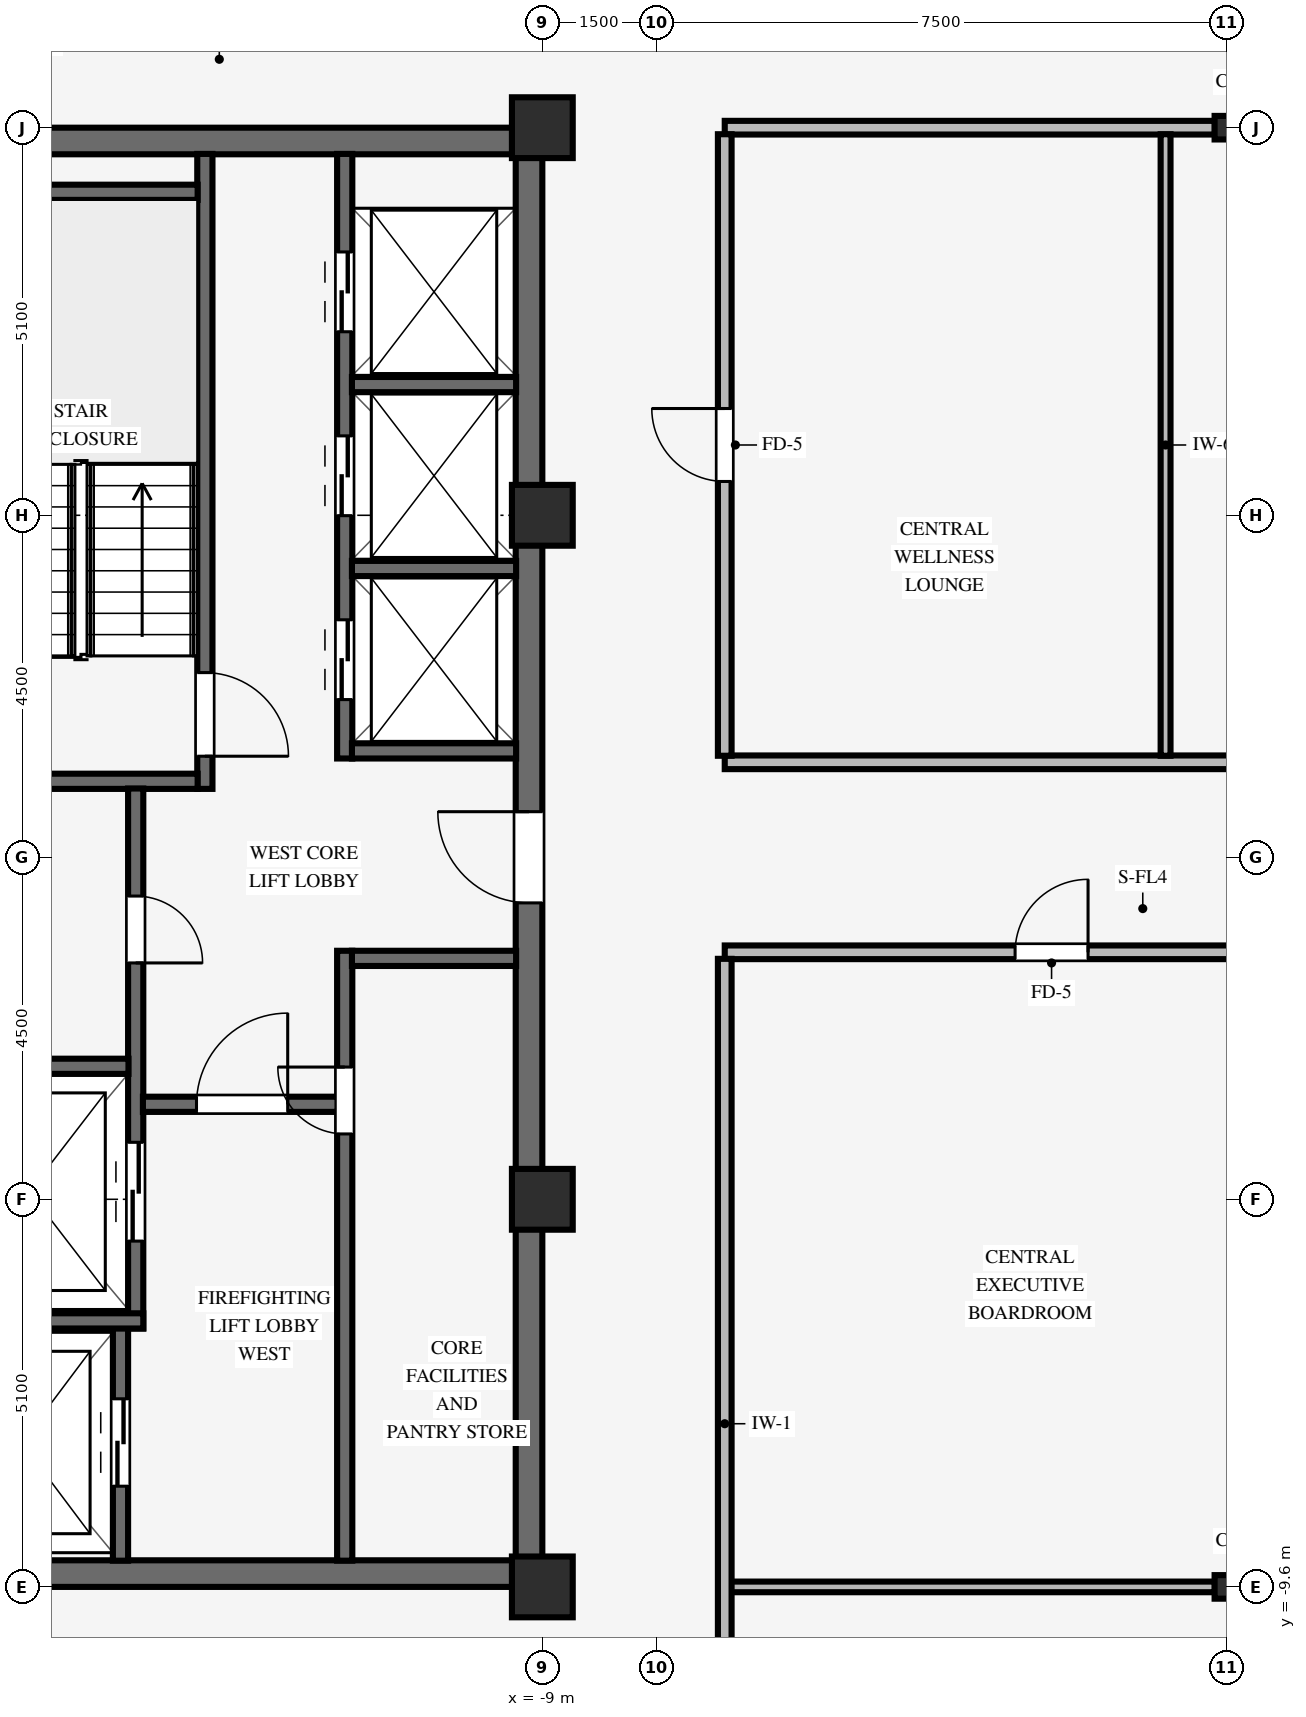
"""IFC4 building model, lengths in metres.
Left out: names, types, materials, properties, quantities, classifications, styles, units other than length and angle.
Written with IfcOpenShell. Run it as: python <this file> out.ifc"""

import sys

from ifc_helpers import new_model, si_unit, direction, frame, frame_2d, origin, origin_2d, place, context, subcontext, project, spatial, rectangle, i_section, extrude, source, transform, mapped, element, fill, save


model = new_model("IFC4")
c1 = context("Model", 3, precision=1e-05, world=origin(), true_north=direction((0.0, 1.0)))
c2 = subcontext(c1, "Body", "Model", "MODEL_VIEW")
j1 = project(units=[si_unit("LENGTHUNIT", "METRE"), si_unit("PLANEANGLEUNIT", "RADIAN")], contexts=[c1])
p1 = place(None, origin())
s1 = spatial("IfcSite", under=j1, at=p1, CompositionType="ELEMENT")
p2 = place(p1, origin())
s2 = spatial("IfcBuilding", under=s1, at=p2, CompositionType="ELEMENT")
p3 = place(p2, frame((0.0, 0.0, 279.85)))
s3 = spatial("IfcBuildingStorey", under=s2, at=p3, CompositionType="ELEMENT", Elevation=279.85)
for number, where, z_axis, x_axis in (
    (1, (-17.5, -9.425, 0.0), (0.0, 0.0, 1.0), (1.0, 0.0, 0.0)),
    (2, (-17.5, 9.425, 0.0), (0.0, 0.0, 1.0), (1.0, 0.0, 0.0)),
):
    element("IfcWall", number, at=place(p3, frame(where, z_axis=z_axis, x_axis=x_axis)), inside=s3, PredefinedType="SHEAR", context=c2, shape_type="SweptSolid", body=[
        extrude(rectangle(XDim=8.5, YDim=0.35, at=frame_2d((4.25, 0.0))), origin(), (0.0, 0.0, 1.0), 3.37),
    ])
p4 = place(p3, frame((-9.175, -9.255, 0.0), z_axis=(0.0, 0.0, 1.0), x_axis=(0.0, 1.0, 0.0)))
e3 = element("IfcWall", 3, at=p4, inside=s3, PredefinedType="SHEAR", context=c2, shape_type="SweptSolid", body=[
    extrude(rectangle(XDim=18.51, YDim=0.35, at=frame_2d((9.255, 0.0))), origin(), (0.0, 0.0, 1.0), 3.37),
])
p5 = place(p4, frame((8.655, 0.0, 0.0)))
e4 = element("IfcOpeningElement", 4, at=p5, cuts=e3, PredefinedType="OPENING", context=c2, shape_type="SweptSolid", body=[
    extrude(rectangle(XDim=1.2, YDim=2.15, at=frame_2d((0.6, 1.075))), frame((0.0, 0.185, 0.0), z_axis=(0.0, -1.0, 0.0), x_axis=(1.0, 0.0, 0.0)), (0.0, 0.0, 1.0), 0.37),
])
for number, where, z_axis, x_axis in (
    (5, (-9.0, -9.6, 0.0), (0.0, 0.0, 1.0), (1.0, 0.0, 0.0)),
    (6, (-9.0, -4.5, 0.0), (0.0, 0.0, 1.0), (1.0, 0.0, 0.0)),
    (7, (-9.0, 4.5, 0.0), (0.0, 0.0, 1.0), (1.0, 0.0, 0.0)),
    (8, (-9.0, 9.6, 0.0), (0.0, 0.0, 1.0), (1.0, 0.0, 0.0)),
):
    element("IfcColumn", number, at=place(p3, frame(where, z_axis=z_axis, x_axis=x_axis)), inside=s3, PredefinedType="COLUMN", context=c2, shape_type="SweptSolid", body=[
        extrude(rectangle(XDim=0.8, YDim=0.8, at=origin_2d()), origin(), (0.0, 0.0, 1.0), 3.37),
    ])
for number, where, z_axis, x_axis in (
    (9, (0.0, -9.6, 0.0), (0.0, 0.0, 1.0), (1.0, 0.0, 0.0)),
    (10, (0.0, 9.6, 0.0), (0.0, 0.0, 1.0), (1.0, 0.0, 0.0)),
):
    element("IfcColumn", number, at=place(p3, frame(where, z_axis=z_axis, x_axis=x_axis)), inside=s3, PredefinedType="COLUMN", context=c2, shape_type="SweptSolid", body=[
        extrude(i_section(OverallWidth=0.31, OverallDepth=0.31, WebThickness=0.015, FlangeThickness=0.015, FilletRadius=0.015, at=origin_2d()), origin(), (0.0, 0.0, 1.0), 3.37),
    ])
p6 = place(p3, frame((-13.44, 0.9, 0.0), z_axis=(0.0, 0.0, 1.0), x_axis=(0.0, 1.0, 0.0)))
e11 = element("IfcWall", 11, at=p6, inside=s3, PredefinedType="SHEAR", context=c2, shape_type="SweptSolid", body=[
    extrude(rectangle(XDim=8.355, YDim=0.2, at=frame_2d((4.177, 0.0))), origin(), (0.0, 0.0, 1.0), 3.37),
])
p7 = place(p6, frame((1.53, 0.0, 0.0), z_axis=(0.0, 0.0, 1.0), x_axis=(-1.0, 0.0, 0.0)))
e12 = element("IfcOpeningElement", 12, at=p7, cuts=e11, PredefinedType="OPENING", context=c2, shape_type="SweptSolid", body=[
    extrude(rectangle(XDim=1.1, YDim=2.15, at=frame_2d((0.55, 1.075))), frame((0.0, 0.11, 0.0), z_axis=(0.0, -1.0, 0.0), x_axis=(1.0, 0.0, 0.0)), (0.0, 0.0, 1.0), 0.22),
])
for number, where, z_axis, x_axis in (
    (13, (-17.155, 1.0, 0.0), (0.0, 0.0, 1.0), (1.0, 0.0, 0.0)),
    (14, (-17.155, 8.75, 0.0), (0.0, 0.0, 1.0), (1.0, 0.0, 0.0)),
):
    element("IfcWall", number, at=place(p3, frame(where, z_axis=z_axis, x_axis=x_axis)), inside=s3, PredefinedType="SHEAR", context=c2, shape_type="SweptSolid", body=[
        extrude(rectangle(XDim=3.62, YDim=0.2, at=frame_2d((1.81, 0.0))), origin(), (0.0, 0.0, 1.0), 3.37),
    ])
p8 = place(p3, frame((-14.55, -9.255, 0.0), z_axis=(0.0, 0.0, 1.0), x_axis=(0.0, 1.0, 0.0)))
e15 = element("IfcWall", 15, at=p8, inside=s3, PredefinedType="SHEAR", context=c2, shape_type="SweptSolid", body=[
    extrude(rectangle(XDim=3.06, YDim=0.2, at=frame_2d((1.53, 0.0))), origin(), (0.0, 0.0, 1.0), 3.37),
])
p9 = place(p8, frame((0.98, 0.0, 0.0)))
e16 = element("IfcOpeningElement", 16, at=p9, cuts=e15, PredefinedType="OPENING", context=c2, shape_type="SweptSolid", body=[
    extrude(rectangle(XDim=1.15, YDim=2.15, at=frame_2d((0.575, 1.075))), frame((0.0, 0.11, 0.0), z_axis=(0.0, -1.0, 0.0), x_axis=(1.0, 0.0, 0.0)), (0.0, 0.0, 1.0), 0.22),
])
p10 = place(p3, frame((-14.35, -6.2, 0.0), z_axis=(0.0, 0.0, 1.0), x_axis=(0.0, 1.0, 0.0)))
e17 = element("IfcWall", 17, at=p10, inside=s3, PredefinedType="SHEAR", context=c2, shape_type="SweptSolid", body=[
    extrude(rectangle(XDim=7.105, YDim=0.2, at=frame_2d((3.552, 0.0))), origin(), (0.0, 0.0, 1.0), 3.37),
])
p11 = place(p10, frame((5.69, 0.0, 0.0), z_axis=(0.0, 0.0, 1.0), x_axis=(-1.0, 0.0, 0.0)))
e18 = element("IfcOpeningElement", 18, at=p11, cuts=e17, PredefinedType="OPENING", context=c2, shape_type="SweptSolid", body=[
    extrude(rectangle(XDim=0.88, YDim=2.1, at=frame_2d((0.44, 1.05))), frame((0.0, 0.11, 0.0), z_axis=(0.0, -1.0, 0.0), x_axis=(1.0, 0.0, 0.0)), (0.0, 0.0, 1.0), 0.22),
])
p12 = place(p10, frame((1.15, 0.0, 0.0)))
e19 = element("IfcOpeningElement", 19, at=p12, cuts=e17, PredefinedType="OPENING", context=c2, shape_type="SweptSolid", body=[
    extrude(rectangle(XDim=1.3, YDim=2.2, at=frame_2d((0.65, 1.1))), frame((0.0, 0.11, 0.0), z_axis=(0.0, -1.0, 0.0), x_axis=(1.0, 0.0, 0.0)), (0.0, 0.0, 1.0), 0.22),
])
p13 = place(p3, frame((-17.155, -6.1, 0.0), z_axis=(0.0, 0.0, 1.0), x_axis=(1.0, 0.0, 0.0)))
e20 = element("IfcWall", 20, at=p13, inside=s3, PredefinedType="SHEAR", context=c2, shape_type="SweptSolid", body=[
    extrude(rectangle(XDim=2.905, YDim=0.2, at=frame_2d((1.453, 0.0))), origin(), (0.0, 0.0, 1.0), 3.37),
])
p14 = place(p3, frame((-17.155, -2.75, 0.0), z_axis=(0.0, 0.0, 1.0), x_axis=(1.0, 0.0, 0.0)))
e21 = element("IfcWall", 21, at=p14, inside=s3, PredefinedType="SHEAR", context=c2, shape_type="SweptSolid", body=[
    extrude(rectangle(XDim=2.71, YDim=0.2, at=frame_2d((1.355, 0.0))), origin(), (0.0, 0.0, 1.0), 3.37),
])
p15 = place(p3, frame((-11.6, -9.255, 0.0), z_axis=(0.0, 0.0, 1.0), x_axis=(0.0, 1.0, 0.0)))
e22 = element("IfcWall", 22, at=p15, inside=s3, PredefinedType="SHEAR", context=c2, shape_type="SweptSolid", body=[
    extrude(rectangle(XDim=8.025, YDim=0.2, at=frame_2d((4.012, 0.0))), origin(), (0.0, 0.0, 1.0), 3.37),
])
p16 = place(p15, frame((5.615, 0.0, 0.0)))
e23 = element("IfcOpeningElement", 23, at=p16, cuts=e22, PredefinedType="OPENING", context=c2, shape_type="SweptSolid", body=[
    extrude(rectangle(XDim=0.88, YDim=2.1, at=frame_2d((0.44, 1.05))), frame((0.0, 0.11, 0.0), z_axis=(0.0, -1.0, 0.0), x_axis=(1.0, 0.0, 0.0)), (0.0, 0.0, 1.0), 0.22),
])
p17 = place(p3, frame((-14.255, -3.25, 0.0), z_axis=(0.0, 0.0, 1.0), x_axis=(1.0, 0.0, 0.0)))
e24 = element("IfcWall", 24, at=p17, inside=s3, PredefinedType="SHEAR", context=c2, shape_type="SweptSolid", body=[
    extrude(rectangle(XDim=2.56, YDim=0.2, at=frame_2d((1.28, 0.0))), origin(), (0.0, 0.0, 1.0), 3.37),
])
p18 = place(p17, frame((0.705, 0.0, 0.0)))
e25 = element("IfcOpeningElement", 25, at=p18, cuts=e24, PredefinedType="OPENING", context=c2, shape_type="SweptSolid", body=[
    extrude(rectangle(XDim=1.2, YDim=2.15, at=frame_2d((0.6, 1.075))), frame((0.0, 0.11, 0.0), z_axis=(0.0, -1.0, 0.0), x_axis=(1.0, 0.0, 0.0)), (0.0, 0.0, 1.0), 0.22),
])
p19 = place(p3, frame((-11.505, -1.33, 0.0), z_axis=(0.0, 0.0, 1.0), x_axis=(1.0, 0.0, 0.0)))
e26 = element("IfcWall", 26, at=p19, inside=s3, PredefinedType="SHEAR", context=c2, shape_type="SweptSolid", body=[
    extrude(rectangle(XDim=2.16, YDim=0.2, at=frame_2d((1.08, 0.0))), origin(), (0.0, 0.0, 1.0), 3.37),
])
p20 = place(p3, frame((-11.6, 1.3, 0.0), z_axis=(0.0, 0.0, 1.0), x_axis=(0.0, 1.0, 0.0)))
e27 = element("IfcWall", 27, at=p20, inside=s3, PredefinedType="SHEAR", context=c2, shape_type="SweptSolid", body=[
    extrude(rectangle(XDim=7.955, YDim=0.2, at=frame_2d((3.978, 0.0))), origin(), (0.0, 0.0, 1.0), 3.37),
])
p21 = place(p20, frame((0.775, 0.0, 0.0)))
e28 = element("IfcOpeningElement", 28, at=p21, cuts=e27, PredefinedType="OPENING", context=c2, shape_type="SweptSolid", body=[
    extrude(rectangle(XDim=1.05, YDim=2.15, at=frame_2d((0.525, 1.075))), frame((0.0, 0.11, 0.0), z_axis=(0.0, -1.0, 0.0), x_axis=(1.0, 0.0, 0.0)), (0.0, 0.0, 1.0), 0.22),
])
p22 = place(p20, frame((3.195, 0.0, 0.0)))
e29 = element("IfcOpeningElement", 29, at=p22, cuts=e27, PredefinedType="OPENING", context=c2, shape_type="SweptSolid", body=[
    extrude(rectangle(XDim=1.05, YDim=2.15, at=frame_2d((0.525, 1.075))), frame((0.0, 0.11, 0.0), z_axis=(0.0, -1.0, 0.0), x_axis=(1.0, 0.0, 0.0)), (0.0, 0.0, 1.0), 0.22),
])
p23 = place(p20, frame((5.615, 0.0, 0.0)))
e30 = element("IfcOpeningElement", 30, at=p23, cuts=e27, PredefinedType="OPENING", context=c2, shape_type="SweptSolid", body=[
    extrude(rectangle(XDim=1.05, YDim=2.15, at=frame_2d((0.525, 1.075))), frame((0.0, 0.11, 0.0), z_axis=(0.0, -1.0, 0.0), x_axis=(1.0, 0.0, 0.0)), (0.0, 0.0, 1.0), 0.22),
])
for number, where, z_axis, x_axis in (
    (31, (-11.505, 1.4, 0.0), (0.0, 0.0, 1.0), (1.0, 0.0, 0.0)),
    (32, (-11.505, 3.8, 0.0), (0.0, 0.0, 1.0), (1.0, 0.0, 0.0)),
    (33, (-11.505, 6.22, 0.0), (0.0, 0.0, 1.0), (1.0, 0.0, 0.0)),
):
    element("IfcWall", number, at=place(p3, frame(where, z_axis=z_axis, x_axis=x_axis)), inside=s3, PredefinedType="SHEAR", context=c2, shape_type="SweptSolid", body=[
        extrude(rectangle(XDim=2.16, YDim=0.2, at=frame_2d((1.08, 0.0))), origin(), (0.0, 0.0, 1.0), 3.37),
    ])
p24 = place(p3, frame((-6.524, -9.6, 0.0), z_axis=(0.0, 0.0, 1.0), x_axis=(1.0, 0.0, 0.0)))
e34 = element("IfcWall", 34, at=p24, inside=s3, PredefinedType="PARTITIONING", context=c2, shape_type="SweptSolid", body=[
    extrude(rectangle(XDim=6.373, YDim=0.14, at=frame_2d((3.187, 0.0))), origin(), (0.0, 0.0, 1.0), 2.405),
])
p25 = place(p3, frame((-6.6, -1.25, 0.0), z_axis=(0.0, 0.0, 1.0), x_axis=(1.0, 0.0, 0.0)))
e35 = element("IfcWall", 35, at=p25, inside=s3, PredefinedType="PARTITIONING", context=c2, shape_type="SweptSolid", body=[
    extrude(rectangle(XDim=13.2, YDim=0.18, at=frame_2d((6.6, 0.0))), origin(), (0.0, 0.0, 1.0), 3.36),
])
p26 = place(p25, frame((3.82, 0.0, 0.0)))
e36 = element("IfcOpeningElement", 36, at=p26, cuts=e35, PredefinedType="OPENING", context=c2, shape_type="SweptSolid", body=[
    extrude(rectangle(XDim=0.96, YDim=2.1, at=frame_2d((0.48, 1.05))), frame((0.0, 0.1, 0.0), z_axis=(0.0, -1.0, 0.0), x_axis=(1.0, 0.0, 0.0)), (0.0, 0.0, 1.0), 0.2),
])
p27 = place(p3, frame((-6.6, 1.25, 0.0), z_axis=(0.0, 0.0, 1.0), x_axis=(1.0, 0.0, 0.0)))
e37 = element("IfcWall", 37, at=p27, inside=s3, PredefinedType="PARTITIONING", context=c2, shape_type="SweptSolid", body=[
    extrude(rectangle(XDim=13.2, YDim=0.18, at=frame_2d((6.6, 0.0))), origin(), (0.0, 0.0, 1.0), 3.36),
])
p28 = place(p3, frame((-6.6, 9.6, 0.0), z_axis=(0.0, 0.0, 1.0), x_axis=(1.0, 0.0, 0.0)))
e38 = element("IfcWall", 38, at=p28, inside=s3, PredefinedType="PARTITIONING", context=c2, shape_type="SweptSolid", body=[
    extrude(rectangle(XDim=6.449, YDim=0.18, at=frame_2d((3.225, 0.0))), origin(), (0.0, 0.0, 1.0), 2.405),
])
p29 = place(p3, frame((-6.6, -19.1, 0.0), z_axis=(0.0, 0.0, 1.0), x_axis=(0.0, 1.0, 0.0)))
e39 = element("IfcWall", 39, at=p29, inside=s3, PredefinedType="PARTITIONING", context=c2, shape_type="SweptSolid", body=[
    extrude(rectangle(XDim=17.764, YDim=0.18, at=frame_2d((8.882, 0.0))), origin(), (0.0, 0.0, 1.0), 3.36),
])
p30 = place(p29, frame((4.12, 0.0, 0.0)))
e40 = element("IfcOpeningElement", 40, at=p30, cuts=e39, PredefinedType="OPENING", context=c2, shape_type="SweptSolid", body=[
    extrude(rectangle(XDim=0.96, YDim=2.1, at=frame_2d((0.48, 1.05))), frame((0.0, 0.1, 0.0), z_axis=(0.0, -1.0, 0.0), x_axis=(1.0, 0.0, 0.0)), (0.0, 0.0, 1.0), 0.2),
])
p31 = place(p3, frame((-6.6, 1.336, 0.0), z_axis=(0.0, 0.0, 1.0), x_axis=(0.0, 1.0, 0.0)))
e41 = element("IfcWall", 41, at=p31, inside=s3, PredefinedType="PARTITIONING", context=c2, shape_type="SweptSolid", body=[
    extrude(rectangle(XDim=8.178, YDim=0.18, at=frame_2d((4.089, 0.0))), origin(), (0.0, 0.0, 1.0), 3.36),
])
p32 = place(p31, frame((3.609, 0.0, 0.0)))
e42 = element("IfcOpeningElement", 42, at=p32, cuts=e41, PredefinedType="OPENING", context=c2, shape_type="SweptSolid", body=[
    extrude(rectangle(XDim=0.96, YDim=2.1, at=frame_2d((0.48, 1.05))), frame((0.0, 0.1, 0.0), z_axis=(0.0, -1.0, 0.0), x_axis=(1.0, 0.0, 0.0)), (0.0, 0.0, 1.0), 0.2),
])
p33 = place(p3, frame((-0.8, 1.336, 0.0), z_axis=(0.0, 0.0, 1.0), x_axis=(0.0, 1.0, 0.0)))
e43 = element("IfcWall", 43, at=p33, inside=s3, PredefinedType="PARTITIONING", context=c2, shape_type="SweptSolid", body=[
    extrude(rectangle(XDim=8.178, YDim=0.13, at=frame_2d((4.089, 0.0))), origin(), (0.0, 0.0, 1.0), 3.36),
])
m1 = source(origin(), c2, "Body", "SweptSolid", [
    extrude(rectangle(XDim=1.1, YDim=2.15, at=frame_2d((0.55, 1.075))), frame((0.0, 0.025, 0.0), z_axis=(0.0, -1.0, 0.0), x_axis=(1.0, 0.0, 0.0)), (0.0, 0.0, 1.0), 0.05),
])
p34 = place(p7, origin())
e44 = element("IfcDoor", 44, at=p34, inside=s3, OperationType="SINGLE_SWING_RIGHT", PredefinedType="DOOR", context=c2, shape_type="MappedRepresentation", body=[
    mapped(m1, transform((0.0, 0.0, 0.0), scale=1.0)),
])
fill(e12, e44)
m2 = source(origin(), c2, "Body", "SweptSolid", [
    extrude(rectangle(XDim=0.88, YDim=2.1, at=frame_2d((0.44, 1.05))), frame((0.0, 0.025, 0.0), z_axis=(0.0, -1.0, 0.0), x_axis=(1.0, 0.0, 0.0)), (0.0, 0.0, 1.0), 0.05),
])
p35 = place(p11, origin())
e45 = element("IfcDoor", 45, at=p35, inside=s3, OperationType="SINGLE_SWING_RIGHT", PredefinedType="DOOR", context=c2, shape_type="MappedRepresentation", body=[
    mapped(m2, transform((0.0, 0.0, 0.0), scale=1.0)),
])
fill(e18, e45)
m3 = source(origin(), c2, "Body", "SweptSolid", [
    extrude(rectangle(XDim=1.2, YDim=2.15, at=frame_2d((0.6, 1.075))), frame((0.0, 0.025, 0.0), z_axis=(0.0, -1.0, 0.0), x_axis=(1.0, 0.0, 0.0)), (0.0, 0.0, 1.0), 0.05),
])
p36 = place(p18, origin())
e46 = element("IfcDoor", 46, at=p36, inside=s3, OperationType="SINGLE_SWING_RIGHT", PredefinedType="DOOR", context=c2, shape_type="MappedRepresentation", body=[
    mapped(m3, transform((0.0, 0.0, 0.0), scale=1.0)),
])
fill(e25, e46)
p37 = place(p16, origin())
e47 = element("IfcDoor", 47, at=p37, inside=s3, OperationType="SINGLE_SWING_RIGHT", PredefinedType="DOOR", context=c2, shape_type="MappedRepresentation", body=[
    mapped(m2, transform((0.0, 0.0, 0.0), scale=1.0)),
])
fill(e23, e47)
p38 = place(p5, origin())
e48 = element("IfcDoor", 48, at=p38, inside=s3, OperationType="SINGLE_SWING_RIGHT", PredefinedType="DOOR", context=c2, shape_type="MappedRepresentation", body=[
    mapped(m3, transform((0.0, 0.0, 0.0), scale=1.0)),
])
fill(e4, e48)
m4 = source(origin(), c2, "Body", "SweptSolid", [
    extrude(rectangle(XDim=1.15, YDim=2.15, at=frame_2d((0.575, 1.075))), frame((0.0, 0.025, 0.0), z_axis=(0.0, -1.0, 0.0), x_axis=(1.0, 0.0, 0.0)), (0.0, 0.0, 1.0), 0.05),
])
p39 = place(p9, origin())
e49 = element("IfcDoor", 49, at=p39, inside=s3, OperationType="DOUBLE_DOOR_SLIDING", PredefinedType="DOOR", context=c2, shape_type="MappedRepresentation", body=[
    mapped(m4, transform((0.0, 0.0, 0.0), scale=1.0)),
])
fill(e16, e49)
m5 = source(origin(), c2, "Body", "SweptSolid", [
    extrude(rectangle(XDim=1.3, YDim=2.2, at=frame_2d((0.65, 1.1))), frame((0.0, 0.025, 0.0), z_axis=(0.0, -1.0, 0.0), x_axis=(1.0, 0.0, 0.0)), (0.0, 0.0, 1.0), 0.05),
])
p40 = place(p12, origin())
e50 = element("IfcDoor", 50, at=p40, inside=s3, OperationType="DOUBLE_DOOR_SLIDING", PredefinedType="DOOR", context=c2, shape_type="MappedRepresentation", body=[
    mapped(m5, transform((0.0, 0.0, 0.0), scale=1.0)),
])
fill(e19, e50)
m6 = source(origin(), c2, "Body", "SweptSolid", [
    extrude(rectangle(XDim=1.05, YDim=2.15, at=frame_2d((0.525, 1.075))), frame((0.0, 0.025, 0.0), z_axis=(0.0, -1.0, 0.0), x_axis=(1.0, 0.0, 0.0)), (0.0, 0.0, 1.0), 0.05),
])
p41 = place(p21, origin())
e51 = element("IfcDoor", 51, at=p41, inside=s3, OperationType="DOUBLE_DOOR_SLIDING", PredefinedType="DOOR", context=c2, shape_type="MappedRepresentation", body=[
    mapped(m6, transform((0.0, 0.0, 0.0), scale=1.0)),
])
fill(e28, e51)
p42 = place(p22, origin())
e52 = element("IfcDoor", 52, at=p42, inside=s3, OperationType="DOUBLE_DOOR_SLIDING", PredefinedType="DOOR", context=c2, shape_type="MappedRepresentation", body=[
    mapped(m6, transform((0.0, 0.0, 0.0), scale=1.0)),
])
fill(e29, e52)
p43 = place(p23, origin())
e53 = element("IfcDoor", 53, at=p43, inside=s3, OperationType="DOUBLE_DOOR_SLIDING", PredefinedType="DOOR", context=c2, shape_type="MappedRepresentation", body=[
    mapped(m6, transform((0.0, 0.0, 0.0), scale=1.0)),
])
fill(e30, e53)
m7 = source(origin(), c2, "Body", "SweptSolid", [
    extrude(rectangle(XDim=0.96, YDim=2.1, at=frame_2d((0.48, 1.05))), frame((0.0, 0.025, 0.0), z_axis=(0.0, -1.0, 0.0), x_axis=(1.0, 0.0, 0.0)), (0.0, 0.0, 1.0), 0.05),
])
p44 = place(p26, origin())
e54 = element("IfcDoor", 54, at=p44, inside=s3, OperationType="SINGLE_SWING_RIGHT", PredefinedType="DOOR", context=c2, shape_type="MappedRepresentation", body=[
    mapped(m7, transform((0.0, 0.0, 0.0), scale=1.0)),
])
fill(e36, e54)
p45 = place(p32, origin())
e55 = element("IfcDoor", 55, at=p45, inside=s3, OperationType="SINGLE_SWING_RIGHT", PredefinedType="DOOR", context=c2, shape_type="MappedRepresentation", body=[
    mapped(m7, transform((0.0, 0.0, 0.0), scale=1.0)),
])
fill(e42, e55)
save(model, sys.argv[1])
